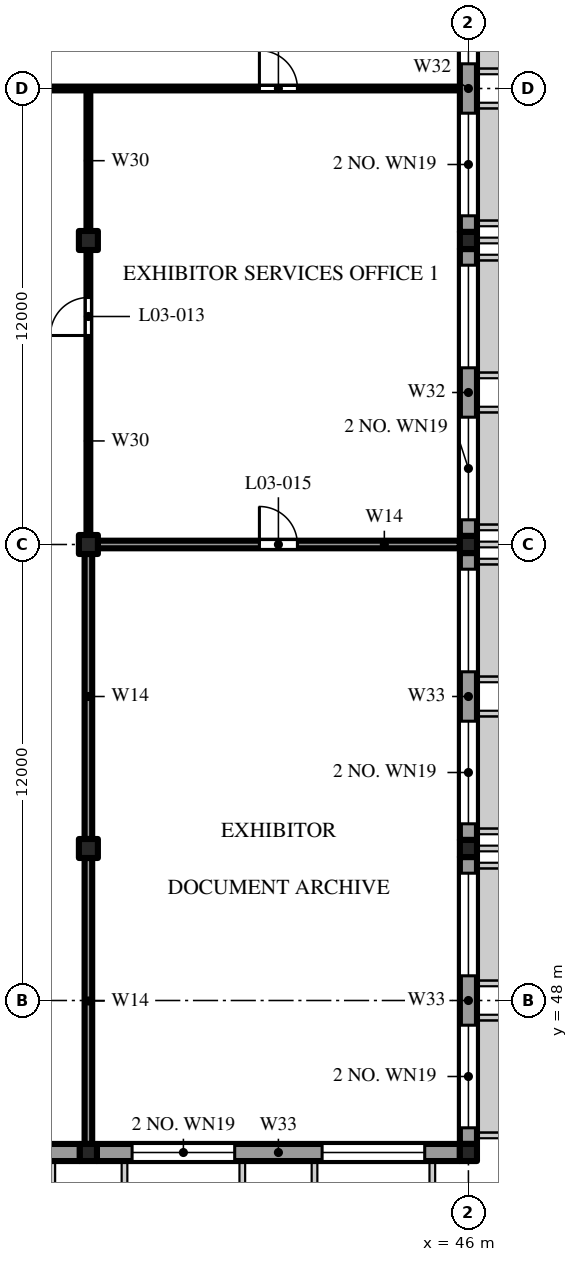
"""IFC4 building model, lengths in metres.
Left out: names, types, materials, properties, quantities, classifications, styles, units other than length and angle.
Written with IfcOpenShell. Run it as: python <this file> out.ifc"""

import sys

from ifc_helpers import new_model, si_unit, direction, frame, frame_2d, origin, origin_2d, place, context, subcontext, project, spatial, polyline, rectangle, outline, extrude, element, fill, save


model = new_model("IFC4")
c1 = context("Model", 3, precision=1e-05, world=origin(), true_north=direction((0.0, 1.0)))
c2 = subcontext(c1, "Body", "Model", "MODEL_VIEW")
j1 = project(units=[si_unit("LENGTHUNIT", "METRE"), si_unit("PLANEANGLEUNIT", "RADIAN")], contexts=[c1])
p1 = place(None, origin())
s1 = spatial("IfcSite", under=j1, at=p1, CompositionType="ELEMENT")
p2 = place(p1, origin())
s2 = spatial("IfcBuilding", under=s1, at=p2, CompositionType="ELEMENT")
p3 = place(p2, frame((0.0, 0.0, 16.8)))
s3 = spatial("IfcBuildingStorey", under=s2, at=p3, CompositionType="ELEMENT", Elevation=16.8)
p4 = place(p3, frame((36.0, 44.0, 0.0), z_axis=(0.0, 0.0, 1.0), x_axis=(1.0, 0.0, 0.0)))
e1 = element("IfcColumn", 1, at=p4, inside=s3, PredefinedType="COLUMN", context=c2, shape_type="SweptSolid", body=[
    extrude(rectangle(XDim=0.45, YDim=0.45, at=origin_2d()), origin(), (0.0, 0.0, 1.0), 3.691),
])
for number, where, z_axis, x_axis in (
    (2, (36.0, 52.0, 0.0), (0.0, 0.0, 1.0), (1.0, 0.0, 0.0)),
    (3, (36.0, 60.0, 0.0), (0.0, 0.0, 1.0), (1.0, 0.0, 0.0)),
    (4, (36.0, 68.0, 0.0), (0.0, 0.0, 1.0), (1.0, 0.0, 0.0)),
):
    element("IfcColumn", number, at=place(p3, frame(where, z_axis=z_axis, x_axis=x_axis)), inside=s3, PredefinedType="COLUMN", context=c2, shape_type="SweptSolid", body=[
        extrude(rectangle(XDim=0.5, YDim=0.5, at=origin_2d()), origin(), (0.0, 0.0, 1.0), 4.8),
    ])
p5 = place(p3, frame((46.0, 44.0, 0.0), z_axis=(0.0, 0.0, 1.0), x_axis=(1.0, 0.0, 0.0)))
e5 = element("IfcColumn", 5, at=p5, inside=s3, PredefinedType="COLUMN", context=c2, shape_type="SweptSolid", body=[
    extrude(rectangle(XDim=0.45, YDim=0.45, at=origin_2d()), origin(), (0.0, 0.0, 1.0), 3.691),
])
for number, where, z_axis, x_axis in (
    (6, (46.0, 52.0, 0.0), (0.0, 0.0, 1.0), (1.0, 0.0, 0.0)),
    (7, (46.0, 60.0, 0.0), (0.0, 0.0, 1.0), (1.0, 0.0, 0.0)),
    (8, (46.0, 68.0, 0.0), (0.0, 0.0, 1.0), (1.0, 0.0, 0.0)),
):
    element("IfcColumn", number, at=place(p3, frame(where, z_axis=z_axis, x_axis=x_axis)), inside=s3, PredefinedType="COLUMN", context=c2, shape_type="SweptSolid", body=[
        extrude(rectangle(XDim=0.45, YDim=0.45, at=origin_2d()), origin(), (0.0, 0.0, 1.0), 4.8),
    ])
p6 = place(p3, frame((26.225, 44.0, 0.0), z_axis=(0.0, 0.0, 1.0), x_axis=(1.0, 0.0, 0.0)))
e9 = element("IfcWall", 9, at=p6, inside=s3, PredefinedType="SOLIDWALL", context=c2, shape_type="SweptSolid", body=[
    extrude(rectangle(XDim=9.55, YDim=0.45, at=frame_2d((4.775, 0.0))), origin(), (0.0, 0.0, 1.0), 3.541),
])
p7 = place(p6, frame((0.925, 0.0, 0.8)))
e10 = element("IfcOpeningElement", 10, at=p7, cuts=e9, PredefinedType="OPENING", context=c2, shape_type="SweptSolid", body=[
    extrude(rectangle(XDim=2.7, YDim=2.4, at=frame_2d((1.35, 1.2))), frame((0.0, 0.235, 0.0), z_axis=(0.0, -1.0, 0.0), x_axis=(1.0, 0.0, 0.0)), (0.0, 0.0, 1.0), 0.47),
])
p8 = place(p6, frame((5.925, 0.0, 0.8)))
e11 = element("IfcOpeningElement", 11, at=p8, cuts=e9, PredefinedType="OPENING", context=c2, shape_type="SweptSolid", body=[
    extrude(rectangle(XDim=2.7, YDim=2.4, at=frame_2d((1.35, 1.2))), frame((0.0, 0.235, 0.0), z_axis=(0.0, -1.0, 0.0), x_axis=(1.0, 0.0, 0.0)), (0.0, 0.0, 1.0), 0.47),
])
p9 = place(p3, frame((36.225, 44.0, 0.0), z_axis=(0.0, 0.0, 1.0), x_axis=(1.0, 0.0, 0.0)))
e12 = element("IfcWall", 12, at=p9, inside=s3, PredefinedType="SOLIDWALL", context=c2, shape_type="SweptSolid", body=[
    extrude(rectangle(XDim=9.55, YDim=0.45, at=frame_2d((4.775, 0.0))), origin(), (0.0, 0.0, 1.0), 3.541),
])
p10 = place(p9, frame((0.925, 0.0, 0.8)))
e13 = element("IfcOpeningElement", 13, at=p10, cuts=e12, PredefinedType="OPENING", context=c2, shape_type="SweptSolid", body=[
    extrude(rectangle(XDim=2.7, YDim=2.4, at=frame_2d((1.35, 1.2))), frame((0.0, 0.235, 0.0), z_axis=(0.0, -1.0, 0.0), x_axis=(1.0, 0.0, 0.0)), (0.0, 0.0, 1.0), 0.47),
])
p11 = place(p9, frame((5.925, 0.0, 0.8)))
e14 = element("IfcOpeningElement", 14, at=p11, cuts=e12, PredefinedType="OPENING", context=c2, shape_type="SweptSolid", body=[
    extrude(rectangle(XDim=2.7, YDim=2.4, at=frame_2d((1.35, 1.2))), frame((0.0, 0.235, 0.0), z_axis=(0.0, -1.0, 0.0), x_axis=(1.0, 0.0, 0.0)), (0.0, 0.0, 1.0), 0.47),
])
p12 = place(p3, frame((36.25, 60.0, 0.0), z_axis=(0.0, 0.0, 1.0), x_axis=(1.0, 0.0, 0.0)))
e15 = element("IfcWall", 15, at=p12, inside=s3, PredefinedType="SOLIDWALL", context=c2, shape_type="SweptSolid", body=[
    extrude(rectangle(XDim=9.525, YDim=0.2, at=frame_2d((4.762, 0.0))), origin(), (0.0, 0.0, 1.0), 6.942),
])
p13 = place(p12, frame((4.25, 0.0, 0.0)))
e16 = element("IfcOpeningElement", 16, at=p13, cuts=e15, PredefinedType="OPENING", context=c2, shape_type="SweptSolid", body=[
    extrude(rectangle(XDim=1.0, YDim=2.1, at=frame_2d((0.5, 1.05))), frame((0.0, 0.11, 0.0), z_axis=(0.0, -1.0, 0.0), x_axis=(1.0, 0.0, 0.0)), (0.0, 0.0, 1.0), 0.22),
])
p14 = place(p3, frame((16.0, 72.0, 0.0), z_axis=(0.0, 0.0, 1.0), x_axis=(1.0, 0.0, 0.0)))
e17 = element("IfcWall", 17, at=p14, inside=s3, PredefinedType="PARTITIONING", context=c2, shape_type="SweptSolid", body=[
    extrude(rectangle(XDim=29.775, YDim=0.1, at=frame_2d((14.887, 0.0))), origin(), (0.0, 0.0, 1.0), 9.493),
])
p15 = place(p14, frame((9.1, 0.0, 0.0)))
e18 = element("IfcOpeningElement", 18, at=p15, cuts=e17, PredefinedType="OPENING", context=c2, shape_type="SweptSolid", body=[
    extrude(rectangle(XDim=1.8, YDim=2.1, at=frame_2d((0.9, 1.05))), frame((0.0, 0.06, 0.0), z_axis=(0.0, -1.0, 0.0), x_axis=(1.0, 0.0, 0.0)), (0.0, 0.0, 1.0), 0.12),
])
p16 = place(p14, frame((24.5, 0.0, 0.0)))
e19 = element("IfcOpeningElement", 19, at=p16, cuts=e17, PredefinedType="OPENING", context=c2, shape_type="SweptSolid", body=[
    extrude(rectangle(XDim=1.0, YDim=2.1, at=frame_2d((0.5, 1.05))), frame((0.0, 0.06, 0.0), z_axis=(0.0, -1.0, 0.0), x_axis=(1.0, 0.0, 0.0)), (0.0, 0.0, 1.0), 0.12),
])
p17 = place(p3, frame((36.0, 44.225, 0.0), z_axis=(0.0, 0.0, 1.0), x_axis=(0.0, 1.0, 0.0)))
e20 = element("IfcWall", 20, at=p17, inside=s3, PredefinedType="SOLIDWALL", context=c2, shape_type="SweptSolid", body=[
    extrude(outline(polyline([(0.0, 0.0), (7.525, 0.0), (7.525, 5.188), (0.0, 3.589), (0.0, 0.0)])), frame((0.0, 0.1, 0.0), z_axis=(0.0, -1.0, 0.0), x_axis=(1.0, 0.0, 0.0)), (0.0, 0.0, 1.0), 0.2),
])
p18 = place(p3, frame((36.0, 52.25, 0.0), z_axis=(0.0, 0.0, 1.0), x_axis=(0.0, 1.0, 0.0)))
e21 = element("IfcWall", 21, at=p18, inside=s3, PredefinedType="SOLIDWALL", context=c2, shape_type="SweptSolid", body=[
    extrude(outline(polyline([(0.0, 0.0), (7.5, 0.0), (7.5, 6.889), (0.0, 5.295), (0.0, 0.0)])), frame((0.0, 0.1, 0.0), z_axis=(0.0, -1.0, 0.0), x_axis=(1.0, 0.0, 0.0)), (0.0, 0.0, 1.0), 0.2),
])
p19 = place(p3, frame((36.0, 60.25, 0.0), z_axis=(0.0, 0.0, 1.0), x_axis=(0.0, 1.0, 0.0)))
e22 = element("IfcWall", 22, at=p19, inside=s3, PredefinedType="PARTITIONING", context=c2, shape_type="SweptSolid", body=[
    extrude(outline(polyline([(0.0, 0.0), (7.5, 0.0), (7.5, 8.589), (0.0, 6.995), (0.0, 0.0)])), frame((0.0, 0.05, 0.0), z_axis=(0.0, -1.0, 0.0), x_axis=(1.0, 0.0, 0.0)), (0.0, 0.0, 1.0), 0.1),
])
p20 = place(p19, frame((5.25, 0.0, 0.0)))
e23 = element("IfcOpeningElement", 23, at=p20, cuts=e22, PredefinedType="OPENING", context=c2, shape_type="SweptSolid", body=[
    extrude(rectangle(XDim=1.0, YDim=2.1, at=frame_2d((0.5, 1.05))), frame((0.0, 0.06, 0.0), z_axis=(0.0, -1.0, 0.0), x_axis=(1.0, 0.0, 0.0)), (0.0, 0.0, 1.0), 0.12),
])
p21 = place(p3, frame((36.0, 68.25, 0.0), z_axis=(0.0, 0.0, 1.0), x_axis=(0.0, 1.0, 0.0)))
e24 = element("IfcWall", 24, at=p21, inside=s3, PredefinedType="PARTITIONING", context=c2, shape_type="SweptSolid", body=[
    extrude(outline(polyline([(0.0, 0.0), (3.7, 0.0), (3.7, 9.482), (0.0, 8.696), (0.0, 0.0)])), frame((0.0, 0.05, 0.0), z_axis=(0.0, -1.0, 0.0), x_axis=(1.0, 0.0, 0.0)), (0.0, 0.0, 1.0), 0.1),
])
p22 = place(p3, frame((46.0, 44.225, 0.0), z_axis=(0.0, 0.0, 1.0), x_axis=(0.0, 1.0, 0.0)))
e25 = element("IfcWall", 25, at=p22, inside=s3, PredefinedType="SOLIDWALL", context=c2, shape_type="SweptSolid", body=[
    extrude(outline(polyline([(0.0, 0.0), (7.55, 0.0), (7.55, 5.194), (0.0, 3.589), (0.0, 0.0)])), frame((0.0, 0.225, 0.0), z_axis=(0.0, -1.0, 0.0), x_axis=(1.0, 0.0, 0.0)), (0.0, 0.0, 1.0), 0.45),
])
p23 = place(p22, frame((0.425, 0.0, 0.8)))
e26 = element("IfcOpeningElement", 26, at=p23, cuts=e25, PredefinedType="OPENING", context=c2, shape_type="SweptSolid", body=[
    extrude(rectangle(XDim=2.7, YDim=2.4, at=frame_2d((1.35, 1.2))), frame((0.0, 0.235, 0.0), z_axis=(0.0, -1.0, 0.0), x_axis=(1.0, 0.0, 0.0)), (0.0, 0.0, 1.0), 0.47),
])
p24 = place(p22, frame((4.425, 0.0, 0.8)))
e27 = element("IfcOpeningElement", 27, at=p24, cuts=e25, PredefinedType="OPENING", context=c2, shape_type="SweptSolid", body=[
    extrude(rectangle(XDim=2.7, YDim=2.4, at=frame_2d((1.35, 1.2))), frame((0.0, 0.235, 0.0), z_axis=(0.0, -1.0, 0.0), x_axis=(1.0, 0.0, 0.0)), (0.0, 0.0, 1.0), 0.47),
])
p25 = place(p3, frame((46.0, 52.225, 0.0), z_axis=(0.0, 0.0, 1.0), x_axis=(0.0, 1.0, 0.0)))
e28 = element("IfcWall", 28, at=p25, inside=s3, PredefinedType="SOLIDWALL", context=c2, shape_type="SweptSolid", body=[
    extrude(outline(polyline([(0.0, 0.0), (7.55, 0.0), (7.55, 6.894), (0.0, 5.289), (0.0, 0.0)])), frame((0.0, 0.225, 0.0), z_axis=(0.0, -1.0, 0.0), x_axis=(1.0, 0.0, 0.0)), (0.0, 0.0, 1.0), 0.45),
])
p26 = place(p25, frame((0.425, 0.0, 0.8)))
e29 = element("IfcOpeningElement", 29, at=p26, cuts=e28, PredefinedType="OPENING", context=c2, shape_type="SweptSolid", body=[
    extrude(rectangle(XDim=2.7, YDim=2.4, at=frame_2d((1.35, 1.2))), frame((0.0, 0.235, 0.0), z_axis=(0.0, -1.0, 0.0), x_axis=(1.0, 0.0, 0.0)), (0.0, 0.0, 1.0), 0.47),
])
p27 = place(p25, frame((4.425, 0.0, 0.8)))
e30 = element("IfcOpeningElement", 30, at=p27, cuts=e28, PredefinedType="OPENING", context=c2, shape_type="SweptSolid", body=[
    extrude(rectangle(XDim=2.7, YDim=2.4, at=frame_2d((1.35, 1.2))), frame((0.0, 0.235, 0.0), z_axis=(0.0, -1.0, 0.0), x_axis=(1.0, 0.0, 0.0)), (0.0, 0.0, 1.0), 0.47),
])
p28 = place(p3, frame((46.0, 60.225, 0.0), z_axis=(0.0, 0.0, 1.0), x_axis=(0.0, 1.0, 0.0)))
e31 = element("IfcWall", 31, at=p28, inside=s3, PredefinedType="SOLIDWALL", context=c2, shape_type="SweptSolid", body=[
    extrude(outline(polyline([(0.0, 0.0), (7.55, 0.0), (7.55, 8.595), (0.0, 6.99), (0.0, 0.0)])), frame((0.0, 0.225, 0.0), z_axis=(0.0, -1.0, 0.0), x_axis=(1.0, 0.0, 0.0)), (0.0, 0.0, 1.0), 0.45),
])
p29 = place(p28, frame((0.425, 0.0, 0.8)))
e32 = element("IfcOpeningElement", 32, at=p29, cuts=e31, PredefinedType="OPENING", context=c2, shape_type="SweptSolid", body=[
    extrude(rectangle(XDim=2.7, YDim=2.4, at=frame_2d((1.35, 1.2))), frame((0.0, 0.235, 0.0), z_axis=(0.0, -1.0, 0.0), x_axis=(1.0, 0.0, 0.0)), (0.0, 0.0, 1.0), 0.47),
])
p30 = place(p28, frame((4.425, 0.0, 0.8)))
e33 = element("IfcOpeningElement", 33, at=p30, cuts=e31, PredefinedType="OPENING", context=c2, shape_type="SweptSolid", body=[
    extrude(rectangle(XDim=2.7, YDim=2.4, at=frame_2d((1.35, 1.2))), frame((0.0, 0.235, 0.0), z_axis=(0.0, -1.0, 0.0), x_axis=(1.0, 0.0, 0.0)), (0.0, 0.0, 1.0), 0.47),
])
p31 = place(p3, frame((46.0, 68.225, 0.0), z_axis=(0.0, 0.0, 1.0), x_axis=(0.0, 1.0, 0.0)))
e34 = element("IfcWall", 34, at=p31, inside=s3, PredefinedType="SOLIDWALL", context=c2, shape_type="SweptSolid", body=[
    extrude(outline(polyline([(0.0, 0.0), (7.55, 0.0), (7.55, 10.295), (0.0, 8.69), (0.0, 0.0)])), frame((0.0, 0.225, 0.0), z_axis=(0.0, -1.0, 0.0), x_axis=(1.0, 0.0, 0.0)), (0.0, 0.0, 1.0), 0.45),
])
p32 = place(p31, frame((0.425, 0.0, 0.8)))
e35 = element("IfcOpeningElement", 35, at=p32, cuts=e34, PredefinedType="OPENING", context=c2, shape_type="SweptSolid", body=[
    extrude(rectangle(XDim=2.7, YDim=2.4, at=frame_2d((1.35, 1.2))), frame((0.0, 0.235, 0.0), z_axis=(0.0, -1.0, 0.0), x_axis=(1.0, 0.0, 0.0)), (0.0, 0.0, 1.0), 0.47),
])
p33 = place(p31, frame((4.425, 0.0, 0.8)))
e36 = element("IfcOpeningElement", 36, at=p33, cuts=e34, PredefinedType="OPENING", context=c2, shape_type="SweptSolid", body=[
    extrude(rectangle(XDim=2.7, YDim=2.4, at=frame_2d((1.35, 1.2))), frame((0.0, 0.235, 0.0), z_axis=(0.0, -1.0, 0.0), x_axis=(1.0, 0.0, 0.0)), (0.0, 0.0, 1.0), 0.47),
])
p34 = place(p20, origin())
e37 = element("IfcDoor", 37, at=p34, inside=s3, OperationType="SINGLE_SWING_LEFT", PredefinedType="DOOR", context=c2, shape_type="SweptSolid", body=[
    extrude(rectangle(XDim=1.0, YDim=2.1, at=frame_2d((0.5, 1.05))), frame((0.0, 0.025, 0.0), z_axis=(0.0, -1.0, 0.0), x_axis=(1.0, 0.0, 0.0)), (0.0, 0.0, 1.0), 0.05),
])
fill(e23, e37)
p35 = place(p16, origin())
e38 = element("IfcDoor", 38, at=p35, inside=s3, OperationType="SINGLE_SWING_RIGHT", PredefinedType="DOOR", context=c2, shape_type="SweptSolid", body=[
    extrude(rectangle(XDim=1.0, YDim=2.1, at=frame_2d((0.5, 1.05))), frame((0.0, 0.025, 0.0), z_axis=(0.0, -1.0, 0.0), x_axis=(1.0, 0.0, 0.0)), (0.0, 0.0, 1.0), 0.05),
])
fill(e19, e38)
p36 = place(p13, origin())
e39 = element("IfcDoor", 39, at=p36, inside=s3, OperationType="SINGLE_SWING_LEFT", PredefinedType="DOOR", context=c2, shape_type="SweptSolid", body=[
    extrude(rectangle(XDim=1.0, YDim=2.1, at=frame_2d((0.5, 1.05))), frame((0.0, 0.025, 0.0), z_axis=(0.0, -1.0, 0.0), x_axis=(1.0, 0.0, 0.0)), (0.0, 0.0, 1.0), 0.05),
])
fill(e16, e39)
p37 = place(p10, origin())
e40 = element("IfcWindow", 40, at=p37, inside=s3, PartitioningType="SINGLE_PANEL", PredefinedType="WINDOW", context=c2, shape_type="SweptSolid", body=[
    extrude(rectangle(XDim=2.7, YDim=2.4, at=frame_2d((1.35, 1.2))), frame((0.0, 0.215, 0.0), z_axis=(0.0, -1.0, 0.0), x_axis=(1.0, 0.0, 0.0)), (0.0, 0.0, 1.0), 0.06),
])
fill(e13, e40)
p38 = place(p11, origin())
e41 = element("IfcWindow", 41, at=p38, inside=s3, PartitioningType="SINGLE_PANEL", PredefinedType="WINDOW", context=c2, shape_type="SweptSolid", body=[
    extrude(rectangle(XDim=2.7, YDim=2.4, at=frame_2d((1.35, 1.2))), frame((0.0, 0.215, 0.0), z_axis=(0.0, -1.0, 0.0), x_axis=(1.0, 0.0, 0.0)), (0.0, 0.0, 1.0), 0.06),
])
fill(e14, e41)
p39 = place(p23, origin())
e42 = element("IfcWindow", 42, at=p39, inside=s3, PartitioningType="SINGLE_PANEL", PredefinedType="WINDOW", context=c2, shape_type="SweptSolid", body=[
    extrude(rectangle(XDim=2.7, YDim=2.4, at=frame_2d((1.35, 1.2))), frame((0.0, 0.215, 0.0), z_axis=(0.0, -1.0, 0.0), x_axis=(1.0, 0.0, 0.0)), (0.0, 0.0, 1.0), 0.06),
])
fill(e26, e42)
p40 = place(p24, origin())
e43 = element("IfcWindow", 43, at=p40, inside=s3, PartitioningType="SINGLE_PANEL", PredefinedType="WINDOW", context=c2, shape_type="SweptSolid", body=[
    extrude(rectangle(XDim=2.7, YDim=2.4, at=frame_2d((1.35, 1.2))), frame((0.0, 0.215, 0.0), z_axis=(0.0, -1.0, 0.0), x_axis=(1.0, 0.0, 0.0)), (0.0, 0.0, 1.0), 0.06),
])
fill(e27, e43)
p41 = place(p26, origin())
e44 = element("IfcWindow", 44, at=p41, inside=s3, PartitioningType="SINGLE_PANEL", PredefinedType="WINDOW", context=c2, shape_type="SweptSolid", body=[
    extrude(rectangle(XDim=2.7, YDim=2.4, at=frame_2d((1.35, 1.2))), frame((0.0, 0.215, 0.0), z_axis=(0.0, -1.0, 0.0), x_axis=(1.0, 0.0, 0.0)), (0.0, 0.0, 1.0), 0.06),
])
fill(e29, e44)
p42 = place(p27, origin())
e45 = element("IfcWindow", 45, at=p42, inside=s3, PartitioningType="SINGLE_PANEL", PredefinedType="WINDOW", context=c2, shape_type="SweptSolid", body=[
    extrude(rectangle(XDim=2.7, YDim=2.4, at=frame_2d((1.35, 1.2))), frame((0.0, 0.215, 0.0), z_axis=(0.0, -1.0, 0.0), x_axis=(1.0, 0.0, 0.0)), (0.0, 0.0, 1.0), 0.06),
])
fill(e30, e45)
p43 = place(p29, origin())
e46 = element("IfcWindow", 46, at=p43, inside=s3, PartitioningType="SINGLE_PANEL", PredefinedType="WINDOW", context=c2, shape_type="SweptSolid", body=[
    extrude(rectangle(XDim=2.7, YDim=2.4, at=frame_2d((1.35, 1.2))), frame((0.0, 0.215, 0.0), z_axis=(0.0, -1.0, 0.0), x_axis=(1.0, 0.0, 0.0)), (0.0, 0.0, 1.0), 0.06),
])
fill(e32, e46)
p44 = place(p30, origin())
e47 = element("IfcWindow", 47, at=p44, inside=s3, PartitioningType="SINGLE_PANEL", PredefinedType="WINDOW", context=c2, shape_type="SweptSolid", body=[
    extrude(rectangle(XDim=2.7, YDim=2.4, at=frame_2d((1.35, 1.2))), frame((0.0, 0.215, 0.0), z_axis=(0.0, -1.0, 0.0), x_axis=(1.0, 0.0, 0.0)), (0.0, 0.0, 1.0), 0.06),
])
fill(e33, e47)
p45 = place(p32, origin())
e48 = element("IfcWindow", 48, at=p45, inside=s3, PartitioningType="SINGLE_PANEL", PredefinedType="WINDOW", context=c2, shape_type="SweptSolid", body=[
    extrude(rectangle(XDim=2.7, YDim=2.4, at=frame_2d((1.35, 1.2))), frame((0.0, 0.215, 0.0), z_axis=(0.0, -1.0, 0.0), x_axis=(1.0, 0.0, 0.0)), (0.0, 0.0, 1.0), 0.06),
])
fill(e35, e48)
p46 = place(p33, origin())
e49 = element("IfcWindow", 49, at=p46, inside=s3, PartitioningType="SINGLE_PANEL", PredefinedType="WINDOW", context=c2, shape_type="SweptSolid", body=[
    extrude(rectangle(XDim=2.7, YDim=2.4, at=frame_2d((1.35, 1.2))), frame((0.0, 0.215, 0.0), z_axis=(0.0, -1.0, 0.0), x_axis=(1.0, 0.0, 0.0)), (0.0, 0.0, 1.0), 0.06),
])
fill(e36, e49)
save(model, sys.argv[1])
